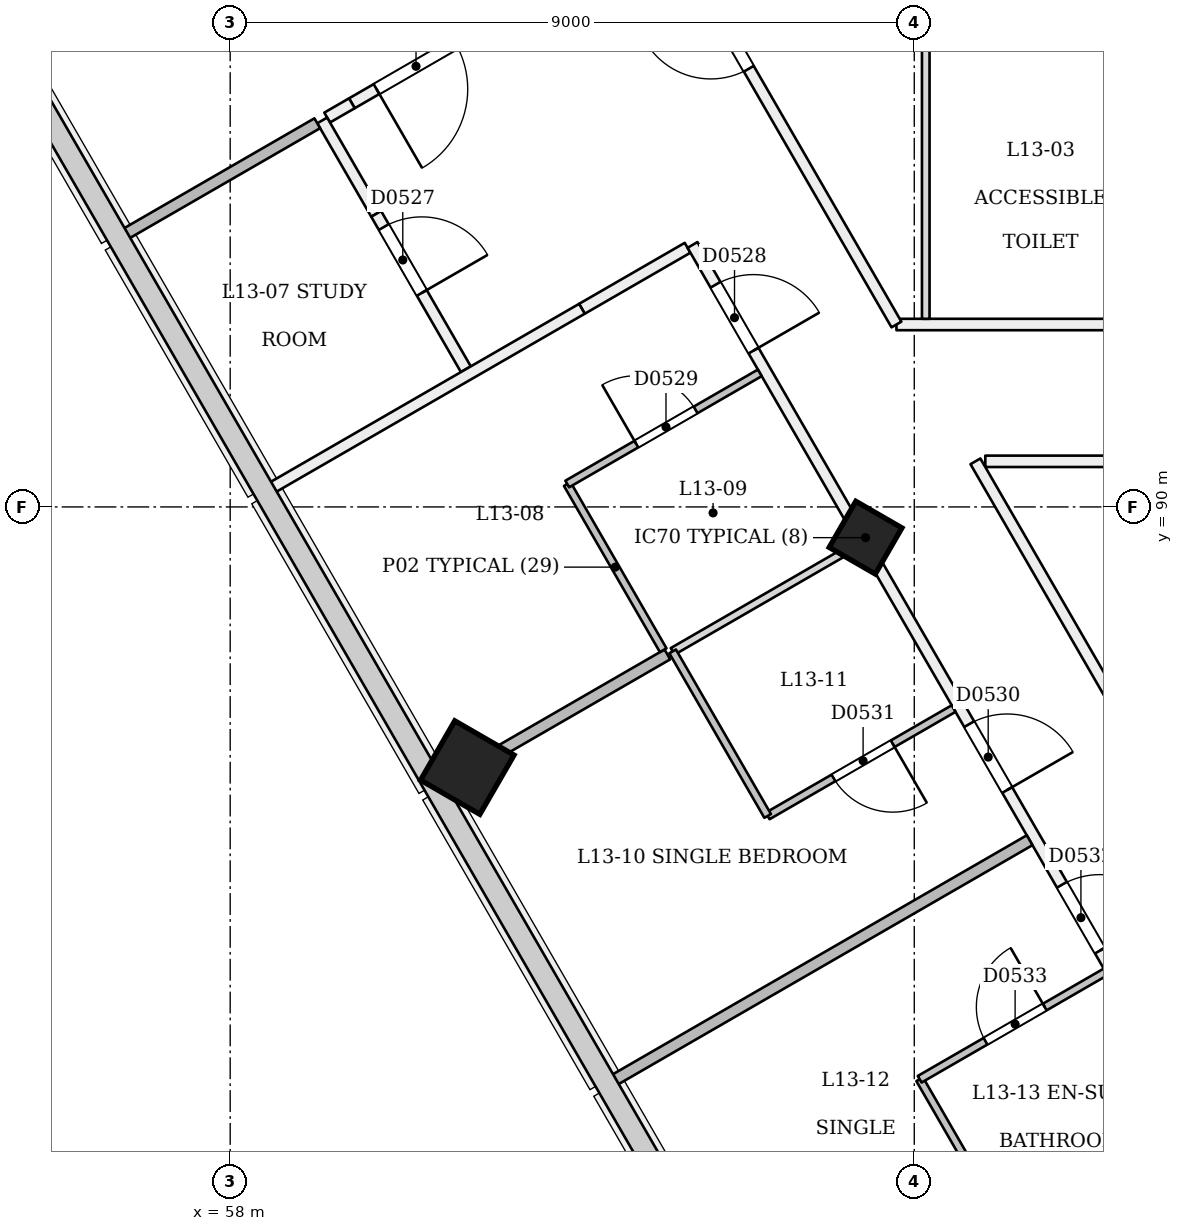
"""IFC4 building model, lengths in metres.
Left out: names, types, materials, properties, quantities, classifications, styles, units other than length and angle.
Written with IfcOpenShell. Run it as: python <this file> out.ifc"""

import sys

from ifc_helpers import new_model, si_unit, direction, frame, frame_2d, origin, origin_2d, place, context, subcontext, project, spatial, rectangle, extrude, element, fill, save


model = new_model("IFC4")
c1 = context("Model", 3, precision=1e-05, world=origin(), true_north=direction((0.0, 1.0)))
c2 = subcontext(c1, "Body", "Model", "MODEL_VIEW")
j1 = project(units=[si_unit("LENGTHUNIT", "METRE"), si_unit("PLANEANGLEUNIT", "RADIAN")], contexts=[c1])
p1 = place(None, origin())
s1 = spatial("IfcSite", under=j1, at=p1, CompositionType="ELEMENT")
p2 = place(p1, origin())
s2 = spatial("IfcBuilding", under=s1, at=p2, CompositionType="ELEMENT")
p3 = place(p2, frame((0.0, 0.0, 55.8)))
s3 = spatial("IfcBuildingStorey", under=s2, at=p3, CompositionType="ELEMENT", Elevation=55.8)
p4 = place(p3, frame((66.332, 89.549, -0.021), z_axis=(0.022222852987, 0.038483477124, 0.999012095419), x_axis=(-0.865642014651, -0.499182113792, 0.038485318511)))
e1 = element("IfcColumn", 1, at=p4, inside=s3, PredefinedType="COLUMN", context=c2, shape_type="SweptSolid", body=[
    extrude(rectangle(XDim=0.7, YDim=0.7, at=origin_2d()), origin(), (0.0, 0.0, 1.0), 3.604),
])
p5 = place(p3, frame((61.093, 86.524, -0.027), z_axis=(0.02215369191, 0.038413282303, 0.999016333038), x_axis=(-0.865364661836, -0.499669122996, 0.038402728683)))
e2 = element("IfcColumn", 2, at=p5, inside=s3, PredefinedType="COLUMN", context=c2, shape_type="SweptSolid", body=[
    extrude(rectangle(XDim=0.9, YDim=0.9, at=origin_2d()), origin(), (0.0, 0.0, 1.0), 3.604),
])
p6 = place(p3, frame((70.125, 92.4, 0.0), z_axis=(0.0, 0.0, 1.0), x_axis=(-1.0, 0.0, 0.0)))
e3 = element("IfcWall", 3, at=p6, inside=s3, PredefinedType="PARTITIONING", context=c2, shape_type="SweptSolid", body=[
    extrude(rectangle(XDim=3.36, YDim=0.15, at=frame_2d((1.68, 0.0))), origin(), (0.0, 0.0, 1.0), 3.1),
])
p7 = place(p3, frame((62.155, 96.785, 0.0), z_axis=(0.0, 0.0, 1.0), x_axis=(-0.866033953121, -0.499985191823, 0.0)))
e4 = element("IfcWall", 4, at=p7, inside=s3, PredefinedType="PARTITIONING", context=c2, shape_type="SweptSolid", body=[
    extrude(rectangle(XDim=2.949, YDim=0.15, at=frame_2d((1.475, 0.0))), origin(), (0.0, 0.0, 1.0), 3.1),
])
p8 = place(p7, frame((1.375, 0.0, 0.0)))
e5 = element("IfcOpeningElement", 5, at=p8, cuts=e4, PredefinedType="OPENING", context=c2, shape_type="SweptSolid", body=[
    extrude(rectangle(XDim=1.2, YDim=2.1, at=frame_2d((0.6, 1.05))), frame((0.0, 0.085, 0.0), z_axis=(0.0, -1.0, 0.0), x_axis=(1.0, 0.0, 0.0)), (0.0, 0.0, 1.0), 0.171),
])
p9 = place(p3, frame((59.601, 95.31, 0.0), z_axis=(0.0, 0.0, 1.0), x_axis=(-0.865752432539, -0.500472502294, 0.0)))
e6 = element("IfcWall", 6, at=p9, inside=s3, PredefinedType="PARTITIONING", context=c2, shape_type="SweptSolid", body=[
    extrude(rectangle(XDim=0.376, YDim=0.15, at=frame_2d((0.188, 0.0))), origin(), (0.0, 0.0, 1.0), 2.6),
])
p10 = place(p3, frame((59.211, 95.085, 0.0), z_axis=(0.0, 0.0, 1.0), x_axis=(0.500114325761, -0.865959387713, 0.0)))
e7 = element("IfcWall", 7, at=p10, inside=s3, PredefinedType="PARTITIONING", context=c2, shape_type="SweptSolid", body=[
    extrude(rectangle(XDim=1.42, YDim=0.15, at=frame_2d((0.71, 0.0))), origin(), (0.0, 0.0, 1.0), 2.6),
])
p11 = place(p3, frame((59.921, 93.855, 0.0), z_axis=(0.0, 0.0, 1.0), x_axis=(0.499967270532, -0.866044299327, 0.0)))
e8 = element("IfcWall", 8, at=p11, inside=s3, PredefinedType="PARTITIONING", context=c2, shape_type="SweptSolid", body=[
    extrude(rectangle(XDim=2.36, YDim=0.15, at=frame_2d((1.18, 0.0))), origin(), (0.0, 0.0, 1.0), 3.1),
])
p12 = place(p11, frame((0.2, 0.0, 0.0)))
e9 = element("IfcOpeningElement", 9, at=p12, cuts=e8, PredefinedType="OPENING", context=c2, shape_type="SweptSolid", body=[
    extrude(rectangle(XDim=1.0, YDim=2.1, at=frame_2d((0.5, 1.05))), frame((0.0, 0.085, 0.0), z_axis=(0.0, -1.0, 0.0), x_axis=(1.0, 0.0, 0.0)), (0.0, 0.0, 1.0), 0.171),
])
p13 = place(p3, frame((62.628, 92.607, 0.0), z_axis=(0.0, 0.0, 1.0), x_axis=(0.866015857963, 0.500016533484, 0.0)))
e10 = element("IfcWall", 10, at=p13, inside=s3, PredefinedType="PARTITIONING", context=c2, shape_type="SweptSolid", body=[
    extrude(rectangle(XDim=1.605, YDim=0.15, at=frame_2d((0.802, 0.0))), origin(), (0.0, 0.0, 1.0), 3.1),
])
p14 = place(p3, frame((64.083, 93.447, 0.0), z_axis=(0.0, 0.0, 1.0), x_axis=(0.5000018851, -0.866024315419, 0.0)))
e11 = element("IfcWall", 11, at=p14, inside=s3, PredefinedType="PARTITIONING", context=c2, shape_type="SweptSolid", body=[
    extrude(rectangle(XDim=36.0, YDim=0.15, at=frame_2d((18.0, 0.0))), origin(), (0.0, 0.0, 1.0), 2.7),
])
p15 = place(p14, frame((0.605, 0.0, 0.0)))
e12 = element("IfcOpeningElement", 12, at=p15, cuts=e11, PredefinedType="OPENING", context=c2, shape_type="SweptSolid", body=[
    extrude(rectangle(XDim=1.0, YDim=2.1, at=frame_2d((0.5, 1.05))), frame((0.0, 0.085, 0.0), z_axis=(0.0, -1.0, 0.0), x_axis=(1.0, 0.0, 0.0)), (0.0, 0.0, 1.0), 0.171),
])
p16 = place(p14, frame((7.28, 0.0, 0.0)))
e13 = element("IfcOpeningElement", 13, at=p16, cuts=e11, PredefinedType="OPENING", context=c2, shape_type="SweptSolid", body=[
    extrude(rectangle(XDim=1.0, YDim=2.1, at=frame_2d((0.5, 1.05))), frame((0.0, 0.085, 0.0), z_axis=(0.0, -1.0, 0.0), x_axis=(1.0, 0.0, 0.0)), (0.0, 0.0, 1.0), 0.171),
])
p17 = place(p14, frame((9.72, 0.0, 0.0)))
e14 = element("IfcOpeningElement", 14, at=p17, cuts=e11, PredefinedType="OPENING", context=c2, shape_type="SweptSolid", body=[
    extrude(rectangle(XDim=1.0, YDim=2.1, at=frame_2d((0.5, 1.05))), frame((0.0, 0.085, 0.0), z_axis=(0.0, -1.0, 0.0), x_axis=(1.0, 0.0, 0.0)), (0.0, 0.0, 1.0), 0.171),
])
p18 = place(p14, frame((16.395, 0.0, 0.0)))
e15 = element("IfcOpeningElement", 15, at=p18, cuts=e11, PredefinedType="OPENING", context=c2, shape_type="SweptSolid", body=[
    extrude(rectangle(XDim=1.0, YDim=2.1, at=frame_2d((0.5, 1.05))), frame((0.0, 0.085, 0.0), z_axis=(0.0, -1.0, 0.0), x_axis=(1.0, 0.0, 0.0)), (0.0, 0.0, 1.0), 0.171),
])
p19 = place(p14, frame((18.72, 0.0, 0.0)))
e16 = element("IfcOpeningElement", 16, at=p19, cuts=e11, PredefinedType="OPENING", context=c2, shape_type="SweptSolid", body=[
    extrude(rectangle(XDim=1.0, YDim=2.1, at=frame_2d((0.5, 1.05))), frame((0.0, 0.085, 0.0), z_axis=(0.0, -1.0, 0.0), x_axis=(1.0, 0.0, 0.0)), (0.0, 0.0, 1.0), 0.171),
])
p20 = place(p14, frame((25.395, 0.0, 0.0)))
e17 = element("IfcOpeningElement", 17, at=p20, cuts=e11, PredefinedType="OPENING", context=c2, shape_type="SweptSolid", body=[
    extrude(rectangle(XDim=1.0, YDim=2.1, at=frame_2d((0.5, 1.05))), frame((0.0, 0.085, 0.0), z_axis=(0.0, -1.0, 0.0), x_axis=(1.0, 0.0, 0.0)), (0.0, 0.0, 1.0), 0.171),
])
p21 = place(p14, frame((27.605, 0.0, 0.0)))
e18 = element("IfcOpeningElement", 18, at=p21, cuts=e11, PredefinedType="OPENING", context=c2, shape_type="SweptSolid", body=[
    extrude(rectangle(XDim=1.0, YDim=2.1, at=frame_2d((0.5, 1.05))), frame((0.0, 0.085, 0.0), z_axis=(0.0, -1.0, 0.0), x_axis=(1.0, 0.0, 0.0)), (0.0, 0.0, 1.0), 0.171),
])
p22 = place(p14, frame((34.28, 0.0, 0.0)))
e19 = element("IfcOpeningElement", 19, at=p22, cuts=e11, PredefinedType="OPENING", context=c2, shape_type="SweptSolid", body=[
    extrude(rectangle(XDim=1.0, YDim=2.1, at=frame_2d((0.5, 1.05))), frame((0.0, 0.085, 0.0), z_axis=(0.0, -1.0, 0.0), x_axis=(1.0, 0.0, 0.0)), (0.0, 0.0, 1.0), 0.171),
])
p23 = place(p3, frame((67.935, 90.6, 0.0), z_axis=(0.0, 0.0, 1.0), x_axis=(1.0, 0.0, 0.0)))
e20 = element("IfcWall", 20, at=p23, inside=s3, PredefinedType="PARTITIONING", context=c2, shape_type="SweptSolid", body=[
    extrude(rectangle(XDim=14.04, YDim=0.15, at=frame_2d((7.02, 0.0))), origin(), (0.0, 0.0, 1.0), 3.1),
])
p24 = place(p23, frame((12.238, 0.0, 0.0)))
e21 = element("IfcOpeningElement", 21, at=p24, cuts=e20, PredefinedType="OPENING", context=c2, shape_type="SweptSolid", body=[
    extrude(rectangle(XDim=1.2, YDim=2.1, at=frame_2d((0.6, 1.05))), frame((0.0, 0.085, 0.0), z_axis=(0.0, -1.0, 0.0), x_axis=(1.0, 0.0, 0.0)), (0.0, 0.0, 1.0), 0.171),
])
p25 = place(p3, frame((85.0, 60.817, 0.0), z_axis=(0.0, 0.0, 1.0), x_axis=(-0.49999631887, 0.866027529076, 0.0)))
e22 = element("IfcWall", 22, at=p25, inside=s3, PredefinedType="PARTITIONING", context=c2, shape_type="SweptSolid", body=[
    extrude(rectangle(XDim=34.391, YDim=0.15, at=frame_2d((17.195, 0.0))), origin(), (0.0, 0.0, 1.0), 3.1),
])
p26 = place(p25, frame((24.599, 0.0, 0.0)))
e23 = element("IfcOpeningElement", 23, at=p26, cuts=e22, PredefinedType="OPENING", context=c2, shape_type="SweptSolid", body=[
    extrude(rectangle(XDim=1.2, YDim=2.1, at=frame_2d((0.6, 1.05))), frame((0.0, 0.085, 0.0), z_axis=(0.0, -1.0, 0.0), x_axis=(1.0, 0.0, 0.0)), (0.0, 0.0, 1.0), 0.171),
])
p27 = place(p25, frame((7.281, 0.0, 0.0)))
e24 = element("IfcOpeningElement", 24, at=p27, cuts=e22, PredefinedType="OPENING", context=c2, shape_type="SweptSolid", body=[
    extrude(rectangle(XDim=1.2, YDim=2.1, at=frame_2d((0.6, 1.05))), frame((0.0, 0.085, 0.0), z_axis=(0.0, -1.0, 0.0), x_axis=(1.0, 0.0, 0.0)), (0.0, 0.0, 1.0), 0.171),
])
p28 = place(p3, frame((66.765, 92.4, 0.0), z_axis=(0.0, 0.0, 1.0), x_axis=(-0.499992497538, 0.86602973529, 0.0)))
e25 = element("IfcWall", 25, at=p28, inside=s3, PredefinedType="PARTITIONING", context=c2, shape_type="SweptSolid", body=[
    extrude(rectangle(XDim=5.165, YDim=0.15, at=frame_2d((2.583, 0.0))), origin(), (0.0, 0.0, 1.0), 3.1),
])
p29 = place(p28, frame((3.885, 0.0, 0.0)))
e26 = element("IfcOpeningElement", 26, at=p29, cuts=e25, PredefinedType="OPENING", context=c2, shape_type="SweptSolid", body=[
    extrude(rectangle(XDim=1.0, YDim=2.1, at=frame_2d((0.5, 1.05))), frame((0.0, 0.085, 0.0), z_axis=(0.0, -1.0, 0.0), x_axis=(1.0, 0.0, 0.0)), (0.0, 0.0, 1.0), 0.171),
])
p30 = place(p3, frame((67.151, 100.163, 0.0), z_axis=(0.0, 0.0, 1.0), x_axis=(0.0, -1.0, 0.0)))
e27 = element("IfcWall", 27, at=p30, inside=s3, PredefinedType="PARTITIONING", context=c2, shape_type="SweptSolid", body=[
    extrude(rectangle(XDim=7.688, YDim=0.1, at=frame_2d((3.844, 0.0))), origin(), (0.0, 0.0, 1.0), 3.1),
])
p31 = place(p3, frame((56.595, 93.575, 0.0), z_axis=(0.0, 0.0, 1.0), x_axis=(0.866010265175, 0.500026219923, 0.0)))
e28 = element("IfcWall", 28, at=p31, inside=s3, PredefinedType="PARTITIONING", context=c2, shape_type="SweptSolid", body=[
    extrude(rectangle(XDim=2.945, YDim=0.15, at=frame_2d((1.473, 0.0))), origin(), (0.0, 0.0, 1.0), 2.6),
])
p32 = place(p3, frame((58.522, 90.237, 0.0), z_axis=(0.0, 0.0, 1.0), x_axis=(0.866028632512, 0.499994407638, 0.0)))
e29 = element("IfcWall", 29, at=p32, inside=s3, PredefinedType="PARTITIONING", context=c2, shape_type="SweptSolid", body=[
    extrude(rectangle(XDim=4.74, YDim=0.15, at=frame_2d((2.37, 0.0))), origin(), (0.0, 0.0, 1.0), 2.6),
])
p33 = place(p3, frame((63.697, 88.115, 0.0), z_axis=(0.0, 0.0, 1.0), x_axis=(-0.50001820224, 0.866014894461, 0.0)))
e30 = element("IfcWall", 30, at=p33, inside=s3, PredefinedType="PARTITIONING", context=c2, shape_type="SweptSolid", body=[
    extrude(rectangle(XDim=2.525, YDim=0.1, at=frame_2d((1.262, 0.0))), origin(), (0.0, 0.0, 1.0), 2.7),
])
p34 = place(p3, frame((62.435, 90.301, 0.0), z_axis=(0.0, 0.0, 1.0), x_axis=(0.865989585315, 0.500062034277, 0.0)))
e31 = element("IfcWall", 31, at=p34, inside=s3, PredefinedType="PARTITIONING", context=c2, shape_type="SweptSolid", body=[
    extrude(rectangle(XDim=2.925, YDim=0.1, at=frame_2d((1.462, 0.0))), origin(), (0.0, 0.0, 1.0), 3.1),
])
p35 = place(p34, frame((1.05, 0.0, 0.0)))
e32 = element("IfcOpeningElement", 32, at=p35, cuts=e31, PredefinedType="OPENING", context=c2, shape_type="SweptSolid", body=[
    extrude(rectangle(XDim=0.9, YDim=2.1, at=frame_2d((0.45, 1.05))), frame((0.0, 0.061, 0.0), z_axis=(0.0, -1.0, 0.0), x_axis=(1.0, 0.0, 0.0)), (0.0, 0.0, 1.0), 0.121),
])
p36 = place(p3, frame((60.79, 86.35, 0.0), z_axis=(0.0, 0.0, 1.0), x_axis=(0.865989424415, 0.500062312919, 0.0)))
e33 = element("IfcWall", 33, at=p36, inside=s3, PredefinedType="PARTITIONING", context=c2, shape_type="SweptSolid", body=[
    extrude(rectangle(XDim=3.42, YDim=0.15, at=frame_2d((1.71, 0.0))), origin(), (0.0, 0.0, 1.0), 2.6),
])
p37 = place(p3, frame((63.821, 88.1, 0.0), z_axis=(0.0, 0.0, 1.0), x_axis=(0.866011447264, 0.500024172624, 0.0)))
e34 = element("IfcWall", 34, at=p37, inside=s3, PredefinedType="PARTITIONING", context=c2, shape_type="SweptSolid", body=[
    extrude(rectangle(XDim=2.825, YDim=0.1, at=frame_2d((1.413, 0.0))), origin(), (0.0, 0.0, 1.0), 2.7),
])
p38 = place(p3, frame((67.518, 87.347, 0.0), z_axis=(0.0, 0.0, 1.0), x_axis=(-0.866011447264, -0.500024172624, 0.0)))
e35 = element("IfcWall", 35, at=p38, inside=s3, PredefinedType="PARTITIONING", context=c2, shape_type="SweptSolid", body=[
    extrude(rectangle(XDim=2.825, YDim=0.1, at=frame_2d((1.413, 0.0))), origin(), (0.0, 0.0, 1.0), 3.1),
])
p39 = place(p38, frame((0.925, 0.0, 0.0)))
e36 = element("IfcOpeningElement", 36, at=p39, cuts=e35, PredefinedType="OPENING", context=c2, shape_type="SweptSolid", body=[
    extrude(rectangle(XDim=0.9, YDim=2.1, at=frame_2d((0.45, 1.05))), frame((0.0, 0.061, 0.0), z_axis=(0.0, -1.0, 0.0), x_axis=(1.0, 0.0, 0.0)), (0.0, 0.0, 1.0), 0.121),
])
p40 = place(p3, frame((65.071, 85.935, 0.0), z_axis=(0.0, 0.0, 1.0), x_axis=(-0.500004234368, 0.866022959057, 0.0)))
e37 = element("IfcWall", 37, at=p40, inside=s3, PredefinedType="PARTITIONING", context=c2, shape_type="SweptSolid", body=[
    extrude(rectangle(XDim=2.5, YDim=0.1, at=frame_2d((1.25, 0.0))), origin(), (0.0, 0.0, 1.0), 2.7),
])
p41 = place(p3, frame((63.022, 82.442, 0.0), z_axis=(0.0, 0.0, 1.0), x_axis=(0.866025401434, 0.500000004071, 0.0)))
e38 = element("IfcWall", 38, at=p41, inside=s3, PredefinedType="PARTITIONING", context=c2, shape_type="SweptSolid", body=[
    extrude(rectangle(XDim=6.345, YDim=0.15, at=frame_2d((3.173, 0.0))), origin(), (0.0, 0.0, 1.0), 2.6),
])
p42 = place(p3, frame((68.171, 80.565, 0.0), z_axis=(0.0, 0.0, 1.0), x_axis=(-0.50002983664, 0.866008176907, 0.0)))
e39 = element("IfcWall", 39, at=p42, inside=s3, PredefinedType="PARTITIONING", context=c2, shape_type="SweptSolid", body=[
    extrude(rectangle(XDim=2.2, YDim=0.1, at=frame_2d((1.1, 0.0))), origin(), (0.0, 0.0, 1.0), 3.1),
])
p43 = place(p3, frame((67.071, 82.47, 0.0), z_axis=(0.0, 0.0, 1.0), x_axis=(0.866011447264, 0.500024172624, 0.0)))
e40 = element("IfcWall", 40, at=p43, inside=s3, PredefinedType="PARTITIONING", context=c2, shape_type="SweptSolid", body=[
    extrude(rectangle(XDim=2.825, YDim=0.1, at=frame_2d((1.413, 0.0))), origin(), (0.0, 0.0, 1.0), 3.1),
])
p44 = place(p43, frame((1.0, 0.0, 0.0)))
e41 = element("IfcOpeningElement", 41, at=p44, cuts=e40, PredefinedType="OPENING", context=c2, shape_type="SweptSolid", body=[
    extrude(rectangle(XDim=0.9, YDim=2.1, at=frame_2d((0.45, 1.05))), frame((0.0, 0.061, 0.0), z_axis=(0.0, -1.0, 0.0), x_axis=(1.0, 0.0, 0.0)), (0.0, 0.0, 1.0), 0.121),
])
p45 = place(p3, frame((68.304, 80.295, 0.0), z_axis=(0.0, 0.0, 1.0), x_axis=(0.866011243319, 0.500024525844, 0.0)))
e42 = element("IfcWall", 42, at=p45, inside=s3, PredefinedType="PARTITIONING", context=c2, shape_type="SweptSolid", body=[
    extrude(rectangle(XDim=2.845, YDim=0.1, at=frame_2d((1.422, 0.0))), origin(), (0.0, 0.0, 1.0), 2.7),
])
p46 = place(p8, origin())
e43 = element("IfcDoor", 43, at=p46, inside=s3, OperationType="SINGLE_SWING_RIGHT", PredefinedType="NOTDEFINED", context=c2, shape_type="SweptSolid", body=[
    extrude(rectangle(XDim=1.2, YDim=2.1, at=frame_2d((0.6, 1.05))), frame((0.0, 0.025, 0.0), z_axis=(0.0, -1.0, 0.0), x_axis=(1.0, 0.0, 0.0)), (0.0, 0.0, 1.0), 0.05),
])
fill(e5, e43)
p47 = place(p12, origin())
e44 = element("IfcDoor", 44, at=p47, inside=s3, OperationType="SINGLE_SWING_RIGHT", PredefinedType="NOTDEFINED", context=c2, shape_type="SweptSolid", body=[
    extrude(rectangle(XDim=1.0, YDim=2.1, at=frame_2d((0.5, 1.05))), frame((0.0, 0.025, 0.0), z_axis=(0.0, -1.0, 0.0), x_axis=(1.0, 0.0, 0.0)), (0.0, 0.0, 1.0), 0.05),
])
fill(e9, e44)
p48 = place(p15, origin())
e45 = element("IfcDoor", 45, at=p48, inside=s3, OperationType="SINGLE_SWING_RIGHT", PredefinedType="NOTDEFINED", context=c2, shape_type="SweptSolid", body=[
    extrude(rectangle(XDim=1.0, YDim=2.1, at=frame_2d((0.5, 1.05))), frame((0.0, 0.025, 0.0), z_axis=(0.0, -1.0, 0.0), x_axis=(1.0, 0.0, 0.0)), (0.0, 0.0, 1.0), 0.05),
])
fill(e12, e45)
p49 = place(p35, origin())
e46 = element("IfcDoor", 46, at=p49, inside=s3, OperationType="SINGLE_SWING_LEFT", PredefinedType="NOTDEFINED", context=c2, shape_type="SweptSolid", body=[
    extrude(rectangle(XDim=0.9, YDim=2.1, at=frame_2d((0.45, 1.05))), frame((0.0, 0.025, 0.0), z_axis=(0.0, -1.0, 0.0), x_axis=(1.0, 0.0, 0.0)), (0.0, 0.0, 1.0), 0.05),
])
fill(e32, e46)
p50 = place(p16, origin())
e47 = element("IfcDoor", 47, at=p50, inside=s3, OperationType="SINGLE_SWING_RIGHT", PredefinedType="NOTDEFINED", context=c2, shape_type="SweptSolid", body=[
    extrude(rectangle(XDim=1.0, YDim=2.1, at=frame_2d((0.5, 1.05))), frame((0.0, 0.025, 0.0), z_axis=(0.0, -1.0, 0.0), x_axis=(1.0, 0.0, 0.0)), (0.0, 0.0, 1.0), 0.05),
])
fill(e13, e47)
p51 = place(p39, origin())
e48 = element("IfcDoor", 48, at=p51, inside=s3, OperationType="SINGLE_SWING_LEFT", PredefinedType="NOTDEFINED", context=c2, shape_type="SweptSolid", body=[
    extrude(rectangle(XDim=0.9, YDim=2.1, at=frame_2d((0.45, 1.05))), frame((0.0, 0.025, 0.0), z_axis=(0.0, -1.0, 0.0), x_axis=(1.0, 0.0, 0.0)), (0.0, 0.0, 1.0), 0.05),
])
fill(e36, e48)
p52 = place(p17, origin())
e49 = element("IfcDoor", 49, at=p52, inside=s3, OperationType="SINGLE_SWING_RIGHT", PredefinedType="NOTDEFINED", context=c2, shape_type="SweptSolid", body=[
    extrude(rectangle(XDim=1.0, YDim=2.1, at=frame_2d((0.5, 1.05))), frame((0.0, 0.025, 0.0), z_axis=(0.0, -1.0, 0.0), x_axis=(1.0, 0.0, 0.0)), (0.0, 0.0, 1.0), 0.05),
])
fill(e14, e49)
p53 = place(p44, origin())
e50 = element("IfcDoor", 50, at=p53, inside=s3, OperationType="SINGLE_SWING_RIGHT", PredefinedType="NOTDEFINED", context=c2, shape_type="SweptSolid", body=[
    extrude(rectangle(XDim=0.9, YDim=2.1, at=frame_2d((0.45, 1.05))), frame((0.0, 0.025, 0.0), z_axis=(0.0, -1.0, 0.0), x_axis=(1.0, 0.0, 0.0)), (0.0, 0.0, 1.0), 0.05),
])
fill(e41, e50)
p54 = place(p29, origin())
e51 = element("IfcDoor", 51, at=p54, inside=s3, OperationType="SINGLE_SWING_RIGHT", PredefinedType="NOTDEFINED", context=c2, shape_type="SweptSolid", body=[
    extrude(rectangle(XDim=1.0, YDim=2.1, at=frame_2d((0.5, 1.05))), frame((0.0, 0.025, 0.0), z_axis=(0.0, -1.0, 0.0), x_axis=(1.0, 0.0, 0.0)), (0.0, 0.0, 1.0), 0.05),
])
fill(e26, e51)
save(model, sys.argv[1])
